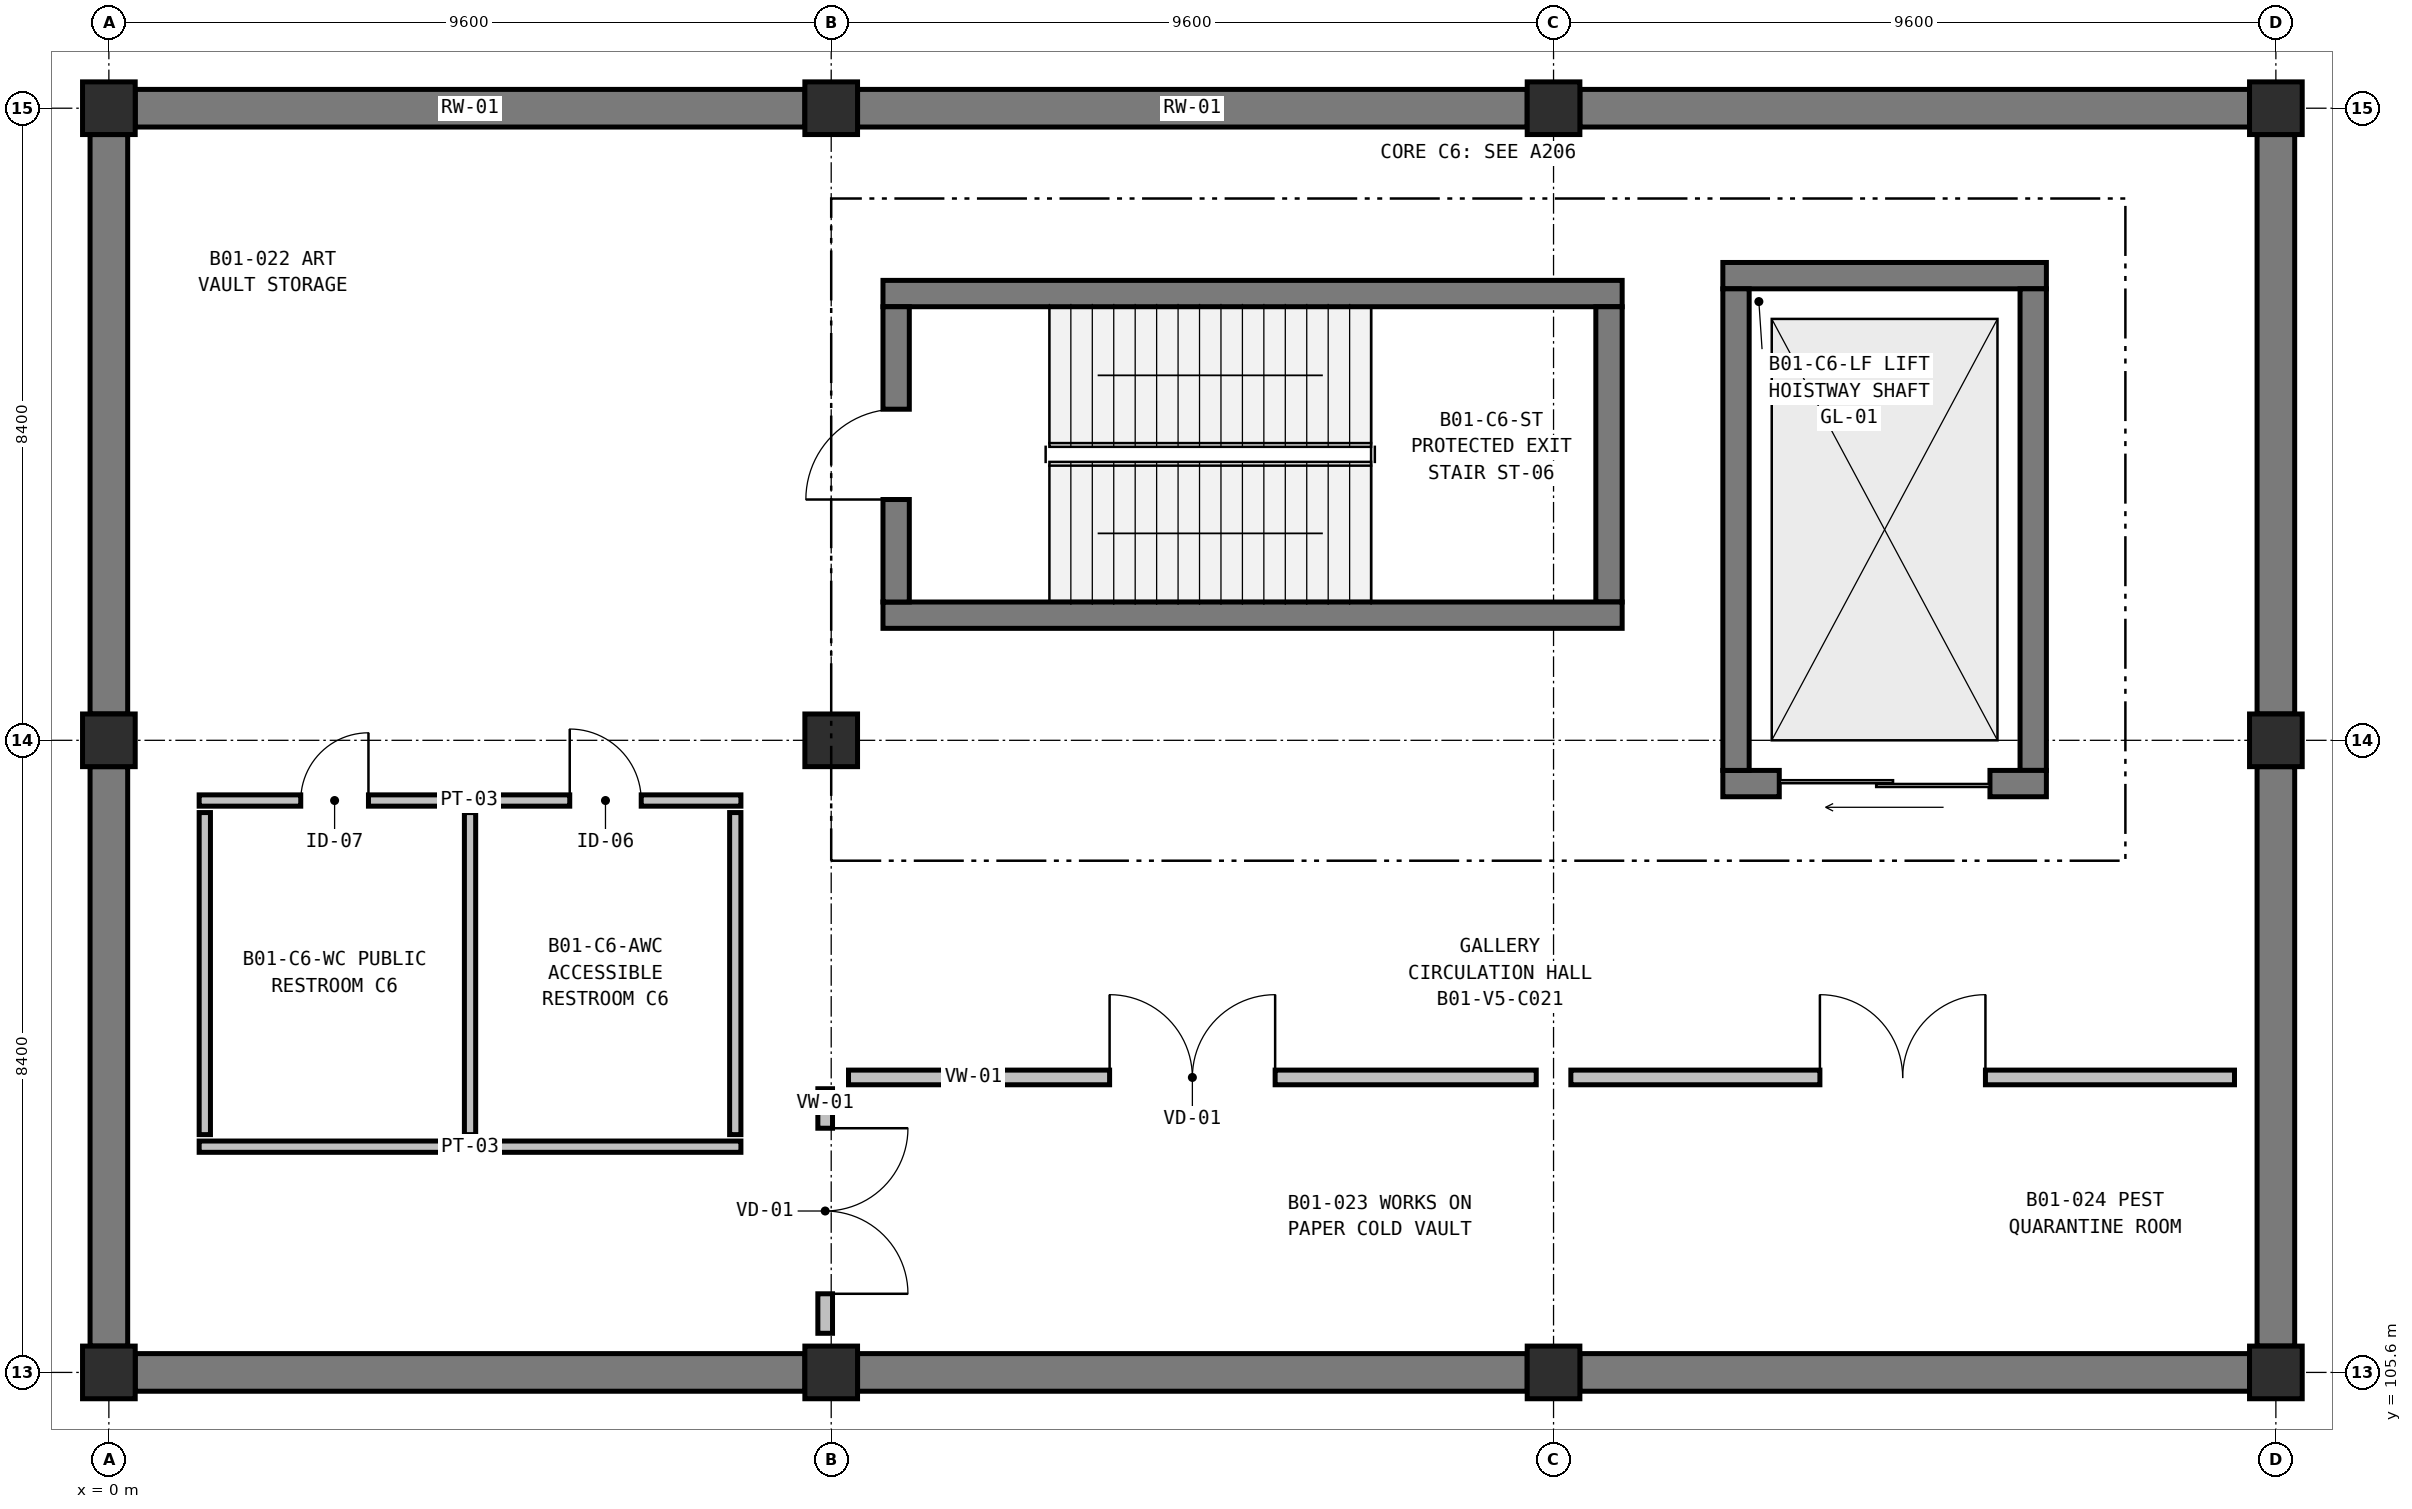
"""IFC4 building model, lengths in metres.
Left out: names, types, materials, properties, quantities, classifications, styles, units other than length and angle.
Written with IfcOpenShell. Run it as: python <this file> out.ifc"""

import sys

from ifc_helpers import new_model, si_unit, direction, frame, frame_2d, origin, origin_2d, place, context, subcontext, project, spatial, rectangle, extrude, element, fill, save


model = new_model("IFC4")
c1 = context("Model", 3, precision=1e-05, world=origin(), true_north=direction((0.0, 1.0)))
c2 = subcontext(c1, "Body", "Model", "MODEL_VIEW")
j1 = project(units=[si_unit("LENGTHUNIT", "METRE"), si_unit("PLANEANGLEUNIT", "RADIAN")], contexts=[c1])
p1 = place(None, origin())
s1 = spatial("IfcSite", under=j1, at=p1, CompositionType="ELEMENT")
p2 = place(p1, origin())
s2 = spatial("IfcBuilding", under=s1, at=p2, CompositionType="ELEMENT")
p3 = place(p2, frame((0.0, 0.0, -5.4)))
s3 = spatial("IfcBuildingStorey", under=s2, at=p3, CompositionType="ELEMENT", Elevation=-5.4)
for number, where, z_axis, x_axis in (
    (1, (0.0, 105.6, 0.0), (0.0, 0.0, 1.0), (1.0, 0.0, 0.0)),
    (2, (0.0, 114.0, 0.0), (0.0, 0.0, 1.0), (1.0, 0.0, 0.0)),
    (3, (0.0, 122.4, 0.0), (0.0, 0.0, 1.0), (1.0, 0.0, 0.0)),
    (4, (9.6, 105.6, 0.0), (0.0, 0.0, 1.0), (1.0, 0.0, 0.0)),
    (5, (9.6, 114.0, 0.0), (0.0, 0.0, 1.0), (1.0, 0.0, 0.0)),
    (6, (9.6, 122.4, 0.0), (0.0, 0.0, 1.0), (1.0, 0.0, 0.0)),
    (7, (19.2, 105.6, 0.0), (0.0, 0.0, 1.0), (1.0, 0.0, 0.0)),
    (8, (19.2, 122.4, 0.0), (0.0, 0.0, 1.0), (1.0, 0.0, 0.0)),
    (9, (28.8, 105.6, 0.0), (0.0, 0.0, 1.0), (1.0, 0.0, 0.0)),
    (10, (28.8, 114.0, 0.0), (0.0, 0.0, 1.0), (1.0, 0.0, 0.0)),
    (11, (28.8, 122.4, 0.0), (0.0, 0.0, 1.0), (1.0, 0.0, 0.0)),
):
    element("IfcColumn", number, at=place(p3, frame(where, z_axis=z_axis, x_axis=x_axis)), inside=s3, PredefinedType="COLUMN", context=c2, shape_type="SweptSolid", body=[
        extrude(rectangle(XDim=0.7, YDim=0.7, at=origin_2d()), origin(), (0.0, 0.0, 1.0), 5.4),
    ])
p4 = place(p3, frame((0.35, 122.4, 0.0), z_axis=(0.0, 0.0, 1.0), x_axis=(1.0, 0.0, 0.0)))
e12 = element("IfcWall", 12, at=p4, inside=s3, PredefinedType="USERDEFINED", context=c2, shape_type="SweptSolid", body=[
    extrude(rectangle(XDim=8.9, YDim=0.5, at=frame_2d((4.45, 0.0))), origin(), (0.0, 0.0, 1.0), 5.06),
])
p5 = place(p3, frame((9.95, 122.4, 0.0), z_axis=(0.0, 0.0, 1.0), x_axis=(1.0, 0.0, 0.0)))
e13 = element("IfcWall", 13, at=p5, inside=s3, PredefinedType="USERDEFINED", context=c2, shape_type="SweptSolid", body=[
    extrude(rectangle(XDim=8.9, YDim=0.5, at=frame_2d((4.45, 0.0))), origin(), (0.0, 0.0, 1.0), 5.06),
])
p6 = place(p3, frame((19.55, 122.4, 0.0), z_axis=(0.0, 0.0, 1.0), x_axis=(1.0, 0.0, 0.0)))
e14 = element("IfcWall", 14, at=p6, inside=s3, PredefinedType="USERDEFINED", context=c2, shape_type="SweptSolid", body=[
    extrude(rectangle(XDim=8.9, YDim=0.5, at=frame_2d((4.45, 0.0))), origin(), (0.0, 0.0, 1.0), 5.06),
])
for number, where, z_axis, x_axis in (
    (15, (28.8, 122.05, 0.0), (0.0, 0.0, 1.0), (0.0, -1.0, 0.0)),
    (16, (28.8, 113.65, 0.0), (0.0, 0.0, 1.0), (0.0, -1.0, 0.0)),
):
    element("IfcWall", number, at=place(p3, frame(where, z_axis=z_axis, x_axis=x_axis)), inside=s3, PredefinedType="USERDEFINED", context=c2, shape_type="SweptSolid", body=[
        extrude(rectangle(XDim=7.7, YDim=0.5, at=frame_2d((3.85, 0.0))), origin(), (0.0, 0.0, 1.0), 5.06),
    ])
p7 = place(p3, frame((28.45, 105.6, 0.0), z_axis=(0.0, 0.0, 1.0), x_axis=(-1.0, 0.0, 0.0)))
e17 = element("IfcWall", 17, at=p7, inside=s3, PredefinedType="USERDEFINED", context=c2, shape_type="SweptSolid", body=[
    extrude(rectangle(XDim=8.9, YDim=0.5, at=frame_2d((4.45, 0.0))), origin(), (0.0, 0.0, 1.0), 5.06),
])
p8 = place(p3, frame((18.85, 105.6, 0.0), z_axis=(0.0, 0.0, 1.0), x_axis=(-1.0, 0.0, 0.0)))
e18 = element("IfcWall", 18, at=p8, inside=s3, PredefinedType="USERDEFINED", context=c2, shape_type="SweptSolid", body=[
    extrude(rectangle(XDim=8.9, YDim=0.5, at=frame_2d((4.45, 0.0))), origin(), (0.0, 0.0, 1.0), 5.06),
])
p9 = place(p3, frame((9.25, 105.6, 0.0), z_axis=(0.0, 0.0, 1.0), x_axis=(-1.0, 0.0, 0.0)))
e19 = element("IfcWall", 19, at=p9, inside=s3, PredefinedType="USERDEFINED", context=c2, shape_type="SweptSolid", body=[
    extrude(rectangle(XDim=8.9, YDim=0.5, at=frame_2d((4.45, 0.0))), origin(), (0.0, 0.0, 1.0), 5.06),
])
for number, where, z_axis, x_axis in (
    (20, (0.0, 105.95, 0.0), (0.0, 0.0, 1.0), (0.0, 1.0, 0.0)),
    (21, (0.0, 114.35, 0.0), (0.0, 0.0, 1.0), (0.0, 1.0, 0.0)),
):
    element("IfcWall", number, at=place(p3, frame(where, z_axis=z_axis, x_axis=x_axis)), inside=s3, PredefinedType="USERDEFINED", context=c2, shape_type="SweptSolid", body=[
        extrude(rectangle(XDim=7.7, YDim=0.5, at=frame_2d((3.85, 0.0))), origin(), (0.0, 0.0, 1.0), 5.06),
    ])
p10 = place(p3, frame((10.288, 119.937, 0.0), z_axis=(0.0, 0.0, 1.0), x_axis=(1.0, 0.0, 0.0)))
e22 = element("IfcWall", 22, at=p10, inside=s3, PredefinedType="SHEAR", context=c2, shape_type="SweptSolid", body=[
    extrude(rectangle(XDim=9.824, YDim=0.35, at=frame_2d((4.912, 0.0))), origin(), (0.0, 0.0, 1.0), 5.06),
])
p11 = place(p3, frame((19.937, 119.762, 0.0), z_axis=(0.0, 0.0, 1.0), x_axis=(0.0, -1.0, 0.0)))
e23 = element("IfcWall", 23, at=p11, inside=s3, PredefinedType="SHEAR", context=c2, shape_type="SweptSolid", body=[
    extrude(rectangle(XDim=3.924, YDim=0.35, at=frame_2d((1.962, 0.0))), origin(), (0.0, 0.0, 1.0), 5.06),
])
p12 = place(p3, frame((20.112, 115.663, 0.0), z_axis=(0.0, 0.0, 1.0), x_axis=(-1.0, 0.0, 0.0)))
e24 = element("IfcWall", 24, at=p12, inside=s3, PredefinedType="SHEAR", context=c2, shape_type="SweptSolid", body=[
    extrude(rectangle(XDim=9.824, YDim=0.35, at=frame_2d((4.912, 0.0))), origin(), (0.0, 0.0, 1.0), 5.06),
])
p13 = place(p3, frame((10.463, 115.838, 0.0), z_axis=(0.0, 0.0, 1.0), x_axis=(0.0, 1.0, 0.0)))
e25 = element("IfcWall", 25, at=p13, inside=s3, PredefinedType="SHEAR", context=c2, shape_type="SweptSolid", body=[
    extrude(rectangle(XDim=3.924, YDim=0.35, at=frame_2d((1.962, 0.0))), origin(), (0.0, 0.0, 1.0), 5.06),
])
p14 = place(p13, frame((1.362, 0.0, 0.0)))
e26 = element("IfcOpeningElement", 26, at=p14, cuts=e25, PredefinedType="OPENING", context=c2, shape_type="SweptSolid", body=[
    extrude(rectangle(XDim=1.2, YDim=2.2, at=frame_2d((0.6, 1.1))), frame((0.0, 0.185, 0.0), z_axis=(0.0, -1.0, 0.0), x_axis=(1.0, 0.0, 0.0)), (0.0, 0.0, 1.0), 0.37),
])
p15 = place(p3, frame((21.45, 120.175, 0.0), z_axis=(0.0, 0.0, 1.0), x_axis=(1.0, 0.0, 0.0)))
e27 = element("IfcWall", 27, at=p15, inside=s3, PredefinedType="SHEAR", context=c2, shape_type="SweptSolid", body=[
    extrude(rectangle(XDim=4.3, YDim=0.35, at=frame_2d((2.15, 0.0))), origin(), (0.0, 0.0, 1.0), 5.06),
])
p16 = place(p3, frame((25.575, 120.0, 0.0), z_axis=(0.0, 0.0, 1.0), x_axis=(0.0, -1.0, 0.0)))
e28 = element("IfcWall", 28, at=p16, inside=s3, PredefinedType="SHEAR", context=c2, shape_type="SweptSolid", body=[
    extrude(rectangle(XDim=6.4, YDim=0.35, at=frame_2d((3.2, 0.0))), origin(), (0.0, 0.0, 1.0), 5.06),
])
p17 = place(p3, frame((25.75, 113.425, 0.0), z_axis=(0.0, 0.0, 1.0), x_axis=(-1.0, 0.0, 0.0)))
e29 = element("IfcWall", 29, at=p17, inside=s3, PredefinedType="SHEAR", context=c2, shape_type="SweptSolid", body=[
    extrude(rectangle(XDim=4.3, YDim=0.35, at=frame_2d((2.15, 0.0))), origin(), (0.0, 0.0, 1.0), 5.06),
])
p18 = place(p17, frame((0.75, 0.0, 0.0)))
e30 = element("IfcOpeningElement", 30, at=p18, cuts=e29, PredefinedType="OPENING", context=c2, shape_type="SweptSolid", body=[
    extrude(rectangle(XDim=2.8, YDim=2.7, at=frame_2d((1.4, 1.35))), frame((0.0, 0.185, 0.0), z_axis=(0.0, -1.0, 0.0), x_axis=(1.0, 0.0, 0.0)), (0.0, 0.0, 1.0), 0.37),
])
p19 = place(p3, frame((21.625, 113.6, 0.0), z_axis=(0.0, 0.0, 1.0), x_axis=(0.0, 1.0, 0.0)))
e31 = element("IfcWall", 31, at=p19, inside=s3, PredefinedType="SHEAR", context=c2, shape_type="SweptSolid", body=[
    extrude(rectangle(XDim=6.4, YDim=0.35, at=frame_2d((3.2, 0.0))), origin(), (0.0, 0.0, 1.0), 5.06),
])
p20 = place(p3, frame((1.2, 113.2, 0.0), z_axis=(0.0, 0.0, 1.0), x_axis=(1.0, 0.0, 0.0)))
e32 = element("IfcWall", 32, at=p20, inside=s3, PredefinedType="PARTITIONING", context=c2, shape_type="SweptSolid", body=[
    extrude(rectangle(XDim=7.2, YDim=0.15, at=frame_2d((3.6, 0.0))), origin(), (0.0, 0.0, 1.0), 5.06),
])
p21 = place(p20, frame((1.35, 0.0, 0.0)))
e33 = element("IfcOpeningElement", 33, at=p21, cuts=e32, PredefinedType="OPENING", context=c2, shape_type="SweptSolid", body=[
    extrude(rectangle(XDim=0.9, YDim=2.1, at=frame_2d((0.45, 1.05))), frame((0.0, 0.085, 0.0), z_axis=(0.0, -1.0, 0.0), x_axis=(1.0, 0.0, 0.0)), (0.0, 0.0, 1.0), 0.17),
])
p22 = place(p20, frame((4.925, 0.0, 0.0)))
e34 = element("IfcOpeningElement", 34, at=p22, cuts=e32, PredefinedType="OPENING", context=c2, shape_type="SweptSolid", body=[
    extrude(rectangle(XDim=0.95, YDim=2.15, at=frame_2d((0.475, 1.075))), frame((0.0, 0.085, 0.0), z_axis=(0.0, -1.0, 0.0), x_axis=(1.0, 0.0, 0.0)), (0.0, 0.0, 1.0), 0.17),
])
p23 = place(p3, frame((1.2, 108.6, 0.0), z_axis=(0.0, 0.0, 1.0), x_axis=(1.0, 0.0, 0.0)))
e35 = element("IfcWall", 35, at=p23, inside=s3, PredefinedType="PARTITIONING", context=c2, shape_type="SweptSolid", body=[
    extrude(rectangle(XDim=7.2, YDim=0.15, at=frame_2d((3.6, 0.0))), origin(), (0.0, 0.0, 1.0), 5.06),
])
for number, where, z_axis, x_axis in (
    (36, (1.275, 108.76, 0.0), (0.0, 0.0, 1.0), (0.0, 1.0, 0.0)),
    (37, (4.8, 108.76, 0.0), (0.0, 0.0, 1.0), (0.0, 1.0, 0.0)),
    (38, (8.325, 108.76, 0.0), (0.0, 0.0, 1.0), (0.0, 1.0, 0.0)),
):
    element("IfcWall", number, at=place(p3, frame(where, z_axis=z_axis, x_axis=x_axis)), inside=s3, PredefinedType="PARTITIONING", context=c2, shape_type="SweptSolid", body=[
        extrude(rectangle(XDim=4.28, YDim=0.15, at=frame_2d((2.14, 0.0))), origin(), (0.0, 0.0, 1.0), 4.435),
    ])
p24 = place(p3, frame((9.52, 109.37, 0.0), z_axis=(0.0, 0.0, 1.0), x_axis=(0.0, -1.0, 0.0)))
e39 = element("IfcWall", 39, at=p24, inside=s3, PredefinedType="PARTITIONING", context=c2, shape_type="SweptSolid", body=[
    extrude(rectangle(XDim=3.25, YDim=0.195, at=frame_2d((1.625, 0.0))), origin(), (0.0, 0.0, 1.0), 4.335),
])
p25 = place(p24, frame((0.525, 0.0, 0.0)))
e40 = element("IfcOpeningElement", 40, at=p25, cuts=e39, PredefinedType="OPENING", context=c2, shape_type="SweptSolid", body=[
    extrude(rectangle(XDim=2.2, YDim=2.6, at=frame_2d((1.1, 1.3))), frame((0.0, 0.107, 0.0), z_axis=(0.0, -1.0, 0.0), x_axis=(1.0, 0.0, 0.0)), (0.0, 0.0, 1.0), 0.215),
])
p26 = place(p3, frame((9.83, 109.52, 0.0), z_axis=(0.0, 0.0, 1.0), x_axis=(1.0, 0.0, 0.0)))
e41 = element("IfcWall", 41, at=p26, inside=s3, PredefinedType="PARTITIONING", context=c2, shape_type="SweptSolid", body=[
    extrude(rectangle(XDim=9.14, YDim=0.195, at=frame_2d((4.57, 0.0))), origin(), (0.0, 0.0, 1.0), 4.335),
])
p27 = place(p26, frame((3.47, 0.0, 0.0)))
e42 = element("IfcOpeningElement", 42, at=p27, cuts=e41, PredefinedType="OPENING", context=c2, shape_type="SweptSolid", body=[
    extrude(rectangle(XDim=2.2, YDim=2.6, at=frame_2d((1.1, 1.3))), frame((0.0, 0.107, 0.0), z_axis=(0.0, -1.0, 0.0), x_axis=(1.0, 0.0, 0.0)), (0.0, 0.0, 1.0), 0.215),
])
p28 = place(p3, frame((19.43, 109.52, 0.0), z_axis=(0.0, 0.0, 1.0), x_axis=(1.0, 0.0, 0.0)))
e43 = element("IfcWall", 43, at=p28, inside=s3, PredefinedType="PARTITIONING", context=c2, shape_type="SweptSolid", body=[
    extrude(rectangle(XDim=8.82, YDim=0.195, at=frame_2d((4.41, 0.0))), origin(), (0.0, 0.0, 1.0), 5.06),
])
p29 = place(p28, frame((3.31, 0.0, 0.0)))
e44 = element("IfcOpeningElement", 44, at=p29, cuts=e43, PredefinedType="OPENING", context=c2, shape_type="SweptSolid", body=[
    extrude(rectangle(XDim=2.2, YDim=2.6, at=frame_2d((1.1, 1.3))), frame((0.0, 0.107, 0.0), z_axis=(0.0, -1.0, 0.0), x_axis=(1.0, 0.0, 0.0)), (0.0, 0.0, 1.0), 0.215),
])
p30 = place(p14, origin())
e45 = element("IfcDoor", 45, at=p30, inside=s3, OperationType="SINGLE_SWING_LEFT", PredefinedType="DOOR", context=c2, shape_type="SweptSolid", body=[
    extrude(rectangle(XDim=1.2, YDim=2.2, at=frame_2d((0.6, 1.1))), frame((0.0, 0.025, 0.0), z_axis=(0.0, -1.0, 0.0), x_axis=(1.0, 0.0, 0.0)), (0.0, 0.0, 1.0), 0.05),
])
fill(e26, e45)
p31 = place(p18, origin())
e46 = element("IfcDoor", 46, at=p31, inside=s3, OperationType="DOUBLE_DOOR_SLIDING", PredefinedType="DOOR", context=c2, shape_type="SweptSolid", body=[
    extrude(rectangle(XDim=2.8, YDim=2.7, at=frame_2d((1.4, 1.35))), frame((0.0, 0.025, 0.0), z_axis=(0.0, -1.0, 0.0), x_axis=(1.0, 0.0, 0.0)), (0.0, 0.0, 1.0), 0.05),
])
fill(e30, e46)
p32 = place(p21, origin())
e47 = element("IfcDoor", 47, at=p32, inside=s3, OperationType="SINGLE_SWING_RIGHT", PredefinedType="DOOR", context=c2, shape_type="SweptSolid", body=[
    extrude(rectangle(XDim=0.9, YDim=2.1, at=frame_2d((0.45, 1.05))), frame((0.0, 0.025, 0.0), z_axis=(0.0, -1.0, 0.0), x_axis=(1.0, 0.0, 0.0)), (0.0, 0.0, 1.0), 0.05),
])
fill(e33, e47)
p33 = place(p22, origin())
e48 = element("IfcDoor", 48, at=p33, inside=s3, OperationType="SINGLE_SWING_LEFT", PredefinedType="DOOR", context=c2, shape_type="SweptSolid", body=[
    extrude(rectangle(XDim=0.95, YDim=2.15, at=frame_2d((0.475, 1.075))), frame((0.0, 0.025, 0.0), z_axis=(0.0, -1.0, 0.0), x_axis=(1.0, 0.0, 0.0)), (0.0, 0.0, 1.0), 0.05),
])
fill(e34, e48)
p34 = place(p25, origin())
e49 = element("IfcDoor", 49, at=p34, inside=s3, OperationType="DOUBLE_DOOR_SINGLE_SWING", PredefinedType="DOOR", context=c2, shape_type="SweptSolid", body=[
    extrude(rectangle(XDim=2.2, YDim=2.6, at=frame_2d((1.1, 1.3))), frame((0.0, 0.025, 0.0), z_axis=(0.0, -1.0, 0.0), x_axis=(1.0, 0.0, 0.0)), (0.0, 0.0, 1.0), 0.05),
])
fill(e40, e49)
p35 = place(p27, origin())
e50 = element("IfcDoor", 50, at=p35, inside=s3, OperationType="DOUBLE_DOOR_SINGLE_SWING", PredefinedType="DOOR", context=c2, shape_type="SweptSolid", body=[
    extrude(rectangle(XDim=2.2, YDim=2.6, at=frame_2d((1.1, 1.3))), frame((0.0, 0.025, 0.0), z_axis=(0.0, -1.0, 0.0), x_axis=(1.0, 0.0, 0.0)), (0.0, 0.0, 1.0), 0.05),
])
fill(e42, e50)
p36 = place(p29, origin())
e51 = element("IfcDoor", 51, at=p36, inside=s3, OperationType="DOUBLE_DOOR_SINGLE_SWING", PredefinedType="DOOR", context=c2, shape_type="SweptSolid", body=[
    extrude(rectangle(XDim=2.2, YDim=2.6, at=frame_2d((1.1, 1.3))), frame((0.0, 0.025, 0.0), z_axis=(0.0, -1.0, 0.0), x_axis=(1.0, 0.0, 0.0)), (0.0, 0.0, 1.0), 0.05),
])
fill(e44, e51)
save(model, sys.argv[1])
